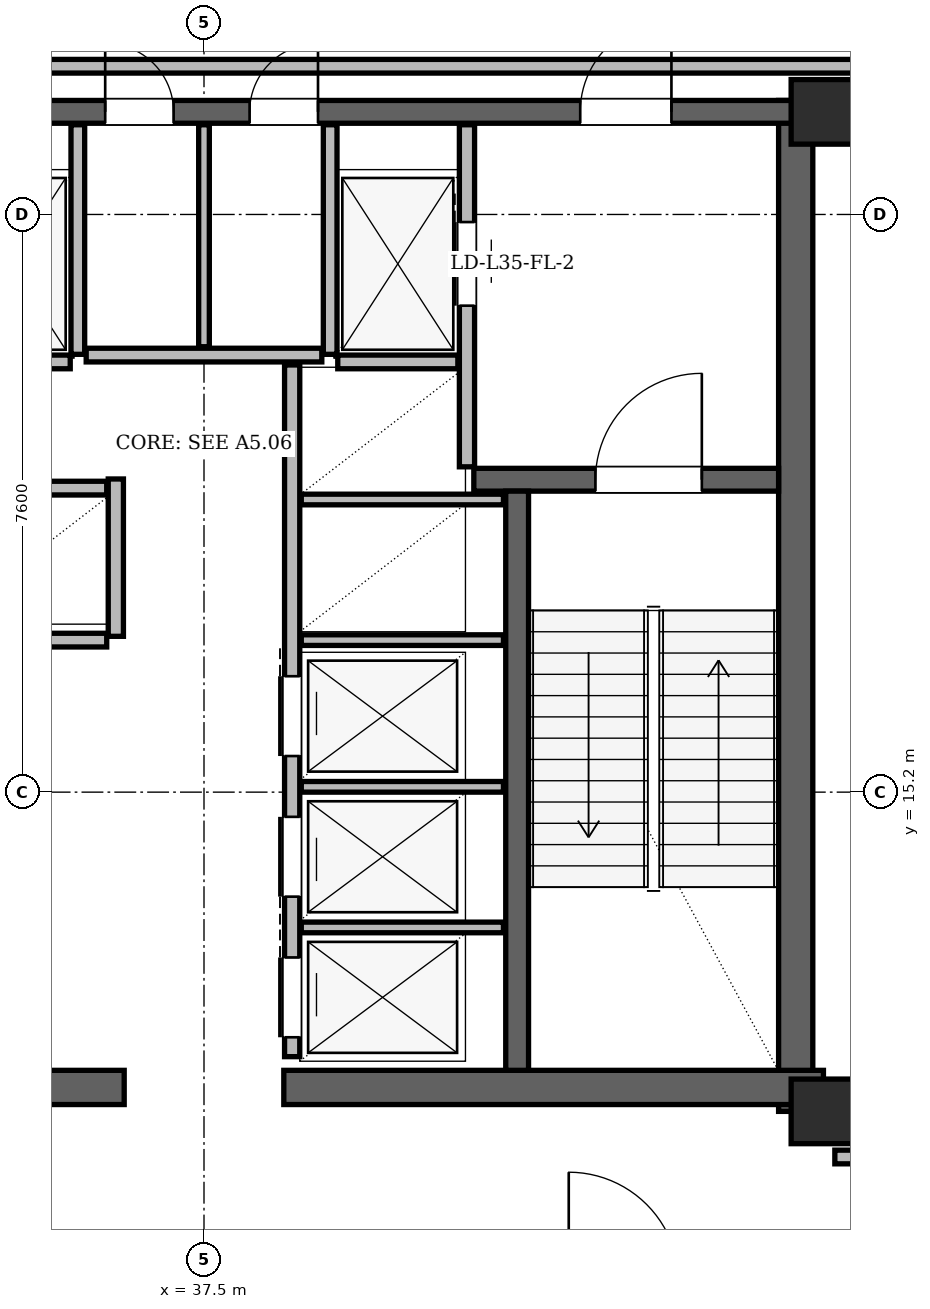
"""IFC4 building model, lengths in metres.
Left out: names, types, materials, properties, quantities, classifications, styles, units other than length and angle.
Written with IfcOpenShell. Run it as: python <this file> out.ifc"""

import sys

from ifc_helpers import new_model, si_unit, direction, frame, frame_2d, origin, origin_2d, place, context, subcontext, project, spatial, rectangle, hollow_rectangle, extrude, element, fill, save


model = new_model("IFC4")
c1 = context("Model", 3, precision=1e-05, world=origin(), true_north=direction((0.0, 1.0)))
c2 = subcontext(c1, "Body", "Model", "MODEL_VIEW")
j1 = project(units=[si_unit("LENGTHUNIT", "METRE"), si_unit("PLANEANGLEUNIT", "RADIAN")], contexts=[c1])
p1 = place(None, origin())
s1 = spatial("IfcSite", under=j1, at=p1, CompositionType="ELEMENT")
p2 = place(p1, origin())
s2 = spatial("IfcBuilding", under=s1, at=p2, CompositionType="ELEMENT")
p3 = place(p2, frame((0.0, 0.0, 133.8)))
s3 = spatial("IfcBuildingStorey", under=s2, at=p3, CompositionType="ELEMENT", Elevation=133.8)
for number, where, z_axis, x_axis in (
    (1, (45.65, 11.0, 0.0), (0.0, 0.0, 1.0), (1.0, 0.0, 0.0)),
    (2, (45.65, 24.15, 0.0), (0.0, 0.0, 1.0), (1.0, 0.0, 0.0)),
):
    element("IfcColumn", number, at=place(p3, frame(where, z_axis=z_axis, x_axis=x_axis)), inside=s3, PredefinedType="COLUMN", context=c2, shape_type="SweptSolid", body=[
        extrude(hollow_rectangle(XDim=0.85, YDim=0.85, WallThickness=0.07, at=origin_2d()), origin(), (0.0, 0.0, 1.0), 4.8),
    ])
p4 = place(p3, frame((45.285, 11.0, 0.0), z_axis=(0.0, 0.0, 1.0), x_axis=(0.0, 1.0, 0.0)))
e3 = element("IfcWall", 3, at=p4, inside=s3, PredefinedType="SHEAR", context=c2, shape_type="SweptSolid", body=[
    extrude(rectangle(XDim=13.3, YDim=0.45, at=frame_2d((6.65, 0.0))), origin(), (0.0, 0.0, 1.0), 4.56),
])
for number, where, z_axis, x_axis in (
    (4, (29.35, 11.315, 0.0), (0.0, 0.0, 1.0), (1.0, 0.0, 0.0)),
    (5, (38.55, 11.315, 0.0), (0.0, 0.0, 1.0), (1.0, 0.0, 0.0)),
):
    element("IfcWall", number, at=place(p3, frame(where, z_axis=z_axis, x_axis=x_axis)), inside=s3, PredefinedType="SHEAR", context=c2, shape_type="SweptSolid", body=[
        extrude(rectangle(XDim=7.1, YDim=0.45, at=frame_2d((3.55, 0.0))), origin(), (0.0, 0.0, 1.0), 4.56),
    ])
p5 = place(p3, frame((29.65, 24.15, 0.0), z_axis=(0.0, 0.0, 1.0), x_axis=(1.0, 0.0, 0.0)))
e6 = element("IfcWall", 6, at=p5, inside=s3, PredefinedType="SHEAR", context=c2, shape_type="SweptSolid", body=[
    extrude(rectangle(XDim=15.7, YDim=0.3, at=frame_2d((7.85, 0.0))), origin(), (0.0, 0.0, 1.0), 4.56),
])
p6 = place(p5, frame((1.7, 0.0, 0.0)))
e7 = element("IfcOpeningElement", 7, at=p6, cuts=e6, PredefinedType="OPENING", context=c2, shape_type="SweptSolid", body=[
    extrude(rectangle(XDim=1.2, YDim=2.2, at=frame_2d((0.6, 1.1))), frame((0.0, 0.15, 0.0), z_axis=(0.0, -1.0, 0.0), x_axis=(1.0, 0.0, 0.0)), (0.0, 0.0, 1.0), 0.3),
])
p7 = place(p5, frame((12.8, 0.0, 0.0)))
e8 = element("IfcOpeningElement", 8, at=p7, cuts=e6, PredefinedType="OPENING", context=c2, shape_type="SweptSolid", body=[
    extrude(rectangle(XDim=1.2, YDim=2.2, at=frame_2d((0.6, 1.1))), frame((0.0, 0.15, 0.0), z_axis=(0.0, -1.0, 0.0), x_axis=(1.0, 0.0, 0.0)), (0.0, 0.0, 1.0), 0.3),
])
p8 = place(p5, frame((6.55, 0.0, 0.0)))
e9 = element("IfcOpeningElement", 9, at=p8, cuts=e6, PredefinedType="OPENING", context=c2, shape_type="SweptSolid", body=[
    extrude(rectangle(XDim=0.9, YDim=2.05, at=frame_2d((0.45, 1.025))), frame((0.0, 0.15, 0.0), z_axis=(0.0, -1.0, 0.0), x_axis=(1.0, 0.0, 0.0)), (0.0, 0.0, 1.0), 0.3),
])
p9 = place(p5, frame((8.45, 0.0, 0.0)))
e10 = element("IfcOpeningElement", 10, at=p9, cuts=e6, PredefinedType="OPENING", context=c2, shape_type="SweptSolid", body=[
    extrude(rectangle(XDim=0.9, YDim=2.05, at=frame_2d((0.45, 1.025))), frame((0.0, 0.15, 0.0), z_axis=(0.0, -1.0, 0.0), x_axis=(1.0, 0.0, 0.0)), (0.0, 0.0, 1.0), 0.3),
])
p10 = place(p3, frame((41.05, 19.31, 0.0), z_axis=(0.0, 0.0, 1.0), x_axis=(1.0, 0.0, 0.0)))
e11 = element("IfcWall", 11, at=p10, inside=s3, PredefinedType="SHEAR", context=c2, shape_type="SweptSolid", body=[
    extrude(rectangle(XDim=4.01, YDim=0.3, at=frame_2d((2.005, 0.0))), origin(), (0.0, 0.0, 1.0), 4.56),
])
p11 = place(p10, frame((1.6, 0.0, 0.0)))
e12 = element("IfcOpeningElement", 12, at=p11, cuts=e11, PredefinedType="OPENING", context=c2, shape_type="SweptSolid", body=[
    extrude(rectangle(XDim=1.4, YDim=2.2, at=frame_2d((0.7, 1.1))), frame((0.0, 0.15, 0.0), z_axis=(0.0, -1.0, 0.0), x_axis=(1.0, 0.0, 0.0)), (0.0, 0.0, 1.0), 0.3),
])
p12 = place(p3, frame((41.62, 11.54, 0.0), z_axis=(0.0, 0.0, 1.0), x_axis=(0.0, 1.0, 0.0)))
e13 = element("IfcWall", 13, at=p12, inside=s3, PredefinedType="SHEAR", context=c2, shape_type="SweptSolid", body=[
    extrude(rectangle(XDim=7.62, YDim=0.3, at=frame_2d((3.81, 0.0))), origin(), (0.0, 0.0, 1.0), 4.56),
])
p13 = place(p3, frame((60.206, 12.89, 0.0), z_axis=(0.0, 0.0, 1.0), x_axis=(-0.4999978793, 0.866026628168, 0.0)))
e14 = element("IfcWall", 14, at=p13, inside=s3, PredefinedType="SOLIDWALL", context=c2, shape_type="SweptSolid", body=[
    extrude(rectangle(XDim=35.194, YDim=0.34, at=frame_2d((17.597, 0.0))), origin(), (0.0, 0.0, 1.0), 3.55),
])
p14 = place(p3, frame((35.84, 20.96, 0.0), z_axis=(0.0, 0.0, 1.0), x_axis=(0.0, 1.0, 0.0)))
e15 = element("IfcWall", 15, at=p14, inside=s3, PredefinedType="PARTITIONING", context=c2, shape_type="SweptSolid", body=[
    extrude(rectangle(XDim=3.02, YDim=0.18, at=frame_2d((1.51, 0.0))), origin(), (0.0, 0.0, 1.0), 3.6),
])
p15 = place(p3, frame((34.16, 20.86, 0.0), z_axis=(0.0, 0.0, 1.0), x_axis=(1.0, 0.0, 0.0)))
e16 = element("IfcWall", 16, at=p15, inside=s3, PredefinedType="PARTITIONING", context=c2, shape_type="SweptSolid", body=[
    extrude(rectangle(XDim=1.58, YDim=0.18, at=frame_2d((0.79, 0.0))), origin(), (0.0, 0.0, 1.0), 4.56),
])
p16 = place(p3, frame((40.96, 19.48, 0.0), z_axis=(0.0, 0.0, 1.0), x_axis=(0.0, 1.0, 0.0)))
e17 = element("IfcWall", 17, at=p16, inside=s3, PredefinedType="PARTITIONING", context=c2, shape_type="SweptSolid", body=[
    extrude(rectangle(XDim=4.5, YDim=0.2, at=frame_2d((2.25, 0.0))), origin(), (0.0, 0.0, 1.0), 3.6),
])
p17 = place(p16, frame((2.12, 0.0, 0.0)))
e18 = element("IfcOpeningElement", 18, at=p17, cuts=e17, PredefinedType="OPENING", context=c2, shape_type="SweptSolid", body=[
    extrude(rectangle(XDim=1.1, YDim=2.2, at=frame_2d((0.55, 1.1))), frame((0.0, 0.1, 0.0), z_axis=(0.0, -1.0, 0.0), x_axis=(1.0, 0.0, 0.0)), (0.0, 0.0, 1.0), 0.2),
])
p18 = place(p3, frame((39.16, 20.96, 0.0), z_axis=(0.0, 0.0, 1.0), x_axis=(0.0, 1.0, 0.0)))
e19 = element("IfcWall", 19, at=p18, inside=s3, PredefinedType="PARTITIONING", context=c2, shape_type="SweptSolid", body=[
    extrude(rectangle(XDim=3.02, YDim=0.18, at=frame_2d((1.51, 0.0))), origin(), (0.0, 0.0, 1.0), 3.6),
])
p19 = place(p3, frame((39.26, 20.86, 0.0), z_axis=(0.0, 0.0, 1.0), x_axis=(1.0, 0.0, 0.0)))
e20 = element("IfcWall", 20, at=p19, inside=s3, PredefinedType="PARTITIONING", context=c2, shape_type="SweptSolid", body=[
    extrude(rectangle(XDim=1.58, YDim=0.18, at=frame_2d((0.79, 0.0))), origin(), (0.0, 0.0, 1.0), 4.56),
])
p20 = place(p3, frame((36.34, 17.25, 0.0), z_axis=(0.0, 0.0, 1.0), x_axis=(0.0, 1.0, 0.0)))
e21 = element("IfcWall", 21, at=p20, inside=s3, PredefinedType="PARTITIONING", context=c2, shape_type="SweptSolid", body=[
    extrude(rectangle(XDim=2.07, YDim=0.2, at=frame_2d((1.035, 0.0))), origin(), (0.0, 0.0, 1.0), 4.56),
])
p21 = place(p3, frame((33.95, 19.2, 0.0), z_axis=(0.0, 0.0, 1.0), x_axis=(1.0, 0.0, 0.0)))
e22 = element("IfcWall", 22, at=p21, inside=s3, PredefinedType="PARTITIONING", context=c2, shape_type="SweptSolid", body=[
    extrude(rectangle(XDim=2.27, YDim=0.18, at=frame_2d((1.135, 0.0))), origin(), (0.0, 0.0, 1.0), 4.56),
])
p22 = place(p3, frame((33.56, 17.2, 0.0), z_axis=(0.0, 0.0, 1.0), x_axis=(1.0, 0.0, 0.0)))
e23 = element("IfcWall", 23, at=p22, inside=s3, PredefinedType="PARTITIONING", context=c2, shape_type="SweptSolid", body=[
    extrude(rectangle(XDim=2.66, YDim=0.18, at=frame_2d((1.33, 0.0))), origin(), (0.0, 0.0, 1.0), 4.56),
])
p23 = place(p3, frame((38.66, 11.72, 0.0), z_axis=(0.0, 0.0, 1.0), x_axis=(0.0, 1.0, 0.0)))
e24 = element("IfcWall", 24, at=p23, inside=s3, PredefinedType="PARTITIONING", context=c2, shape_type="SweptSolid", body=[
    extrude(rectangle(XDim=9.1, YDim=0.2, at=frame_2d((4.55, 0.0))), origin(), (0.0, 0.0, 1.0), 4.56),
])
p24 = place(p23, frame((0.255, 0.0, 0.0)))
e25 = element("IfcOpeningElement", 25, at=p24, cuts=e24, PredefinedType="OPENING", context=c2, shape_type="SweptSolid", body=[
    extrude(rectangle(XDim=1.05, YDim=2.15, at=frame_2d((0.525, 1.075))), frame((0.0, 0.1, 0.0), z_axis=(0.0, -1.0, 0.0), x_axis=(1.0, 0.0, 0.0)), (0.0, 0.0, 1.0), 0.2),
])
p25 = place(p23, frame((2.105, 0.0, 0.0)))
e26 = element("IfcOpeningElement", 26, at=p25, cuts=e24, PredefinedType="OPENING", context=c2, shape_type="SweptSolid", body=[
    extrude(rectangle(XDim=1.05, YDim=2.15, at=frame_2d((0.525, 1.075))), frame((0.0, 0.1, 0.0), z_axis=(0.0, -1.0, 0.0), x_axis=(1.0, 0.0, 0.0)), (0.0, 0.0, 1.0), 0.2),
])
p26 = place(p23, frame((3.955, 0.0, 0.0)))
e27 = element("IfcOpeningElement", 27, at=p26, cuts=e24, PredefinedType="OPENING", context=c2, shape_type="SweptSolid", body=[
    extrude(rectangle(XDim=1.05, YDim=2.15, at=frame_2d((0.525, 1.075))), frame((0.0, 0.1, 0.0), z_axis=(0.0, -1.0, 0.0), x_axis=(1.0, 0.0, 0.0)), (0.0, 0.0, 1.0), 0.2),
])
for number, where, z_axis, x_axis in (
    (28, (38.78, 13.42, 0.0), (0.0, 0.0, 1.0), (1.0, 0.0, 0.0)),
    (29, (38.78, 15.27, 0.0), (0.0, 0.0, 1.0), (1.0, 0.0, 0.0)),
    (30, (38.78, 17.2, 0.0), (0.0, 0.0, 1.0), (1.0, 0.0, 0.0)),
    (31, (38.78, 19.05, 0.0), (0.0, 0.0, 1.0), (1.0, 0.0, 0.0)),
):
    element("IfcWall", number, at=place(p3, frame(where, z_axis=z_axis, x_axis=x_axis)), inside=s3, PredefinedType="PARTITIONING", context=c2, shape_type="SweptSolid", body=[
        extrude(rectangle(XDim=2.66, YDim=0.14, at=frame_2d((1.33, 0.0))), origin(), (0.0, 0.0, 1.0), 4.56),
    ])
p27 = place(p3, frame((35.95, 20.95, 0.0), z_axis=(0.0, 0.0, 1.0), x_axis=(1.0, 0.0, 0.0)))
e32 = element("IfcWall", 32, at=p27, inside=s3, PredefinedType="PARTITIONING", context=c2, shape_type="SweptSolid", body=[
    extrude(rectangle(XDim=3.1, YDim=0.18, at=frame_2d((1.55, 0.0))), origin(), (0.0, 0.0, 1.0), 4.56),
])
p28 = place(p3, frame((37.5, 21.06, 0.0), z_axis=(0.0, 0.0, 1.0), x_axis=(0.0, 1.0, 0.0)))
e33 = element("IfcWall", 33, at=p28, inside=s3, PredefinedType="PARTITIONING", context=c2, shape_type="SweptSolid", body=[
    extrude(rectangle(XDim=2.92, YDim=0.14, at=frame_2d((1.46, 0.0))), origin(), (0.0, 0.0, 1.0), 3.6),
])
p29 = place(p3, frame((45.8, 10.4, 0.0), z_axis=(0.0, 0.0, 1.0), x_axis=(1.0, 0.0, 0.0)))
e34 = element("IfcWall", 34, at=p29, inside=s3, PredefinedType="PARTITIONING", context=c2, shape_type="SweptSolid", body=[
    extrude(rectangle(XDim=2.8, YDim=0.18, at=frame_2d((1.4, 0.0))), origin(), (0.0, 0.0, 1.0), 4.014),
])
p30 = place(p3, frame((28.62, 24.75, 0.0), z_axis=(0.0, 0.0, 1.0), x_axis=(1.0, 0.0, 0.0)))
e35 = element("IfcWall", 35, at=p30, inside=s3, PredefinedType="PARTITIONING", context=c2, shape_type="SweptSolid", body=[
    extrude(rectangle(XDim=19.98, YDim=0.18, at=frame_2d((9.99, 0.0))), origin(), (0.0, 0.0, 1.0), 4.014),
])
p31 = place(p17, origin())
e36 = element("IfcDoor", 36, at=p31, inside=s3, OperationType="SLIDING_TO_RIGHT", PredefinedType="DOOR", context=c2, shape_type="SweptSolid", body=[
    extrude(rectangle(XDim=1.1, YDim=2.2, at=frame_2d((0.55, 1.1))), frame((0.0, 0.025, 0.0), z_axis=(0.0, -1.0, 0.0), x_axis=(1.0, 0.0, 0.0)), (0.0, 0.0, 1.0), 0.05),
])
fill(e18, e36)
p32 = place(p24, origin())
e37 = element("IfcDoor", 37, at=p32, inside=s3, OperationType="SLIDING_TO_RIGHT", PredefinedType="DOOR", context=c2, shape_type="SweptSolid", body=[
    extrude(rectangle(XDim=1.05, YDim=2.15, at=frame_2d((0.525, 1.075))), frame((0.0, 0.025, 0.0), z_axis=(0.0, -1.0, 0.0), x_axis=(1.0, 0.0, 0.0)), (0.0, 0.0, 1.0), 0.05),
])
fill(e25, e37)
p33 = place(p25, origin())
e38 = element("IfcDoor", 38, at=p33, inside=s3, OperationType="SLIDING_TO_LEFT", PredefinedType="DOOR", context=c2, shape_type="SweptSolid", body=[
    extrude(rectangle(XDim=1.05, YDim=2.15, at=frame_2d((0.525, 1.075))), frame((0.0, 0.025, 0.0), z_axis=(0.0, -1.0, 0.0), x_axis=(1.0, 0.0, 0.0)), (0.0, 0.0, 1.0), 0.05),
])
fill(e26, e38)
p34 = place(p26, origin())
e39 = element("IfcDoor", 39, at=p34, inside=s3, OperationType="SLIDING_TO_RIGHT", PredefinedType="DOOR", context=c2, shape_type="SweptSolid", body=[
    extrude(rectangle(XDim=1.05, YDim=2.15, at=frame_2d((0.525, 1.075))), frame((0.0, 0.025, 0.0), z_axis=(0.0, -1.0, 0.0), x_axis=(1.0, 0.0, 0.0)), (0.0, 0.0, 1.0), 0.05),
])
fill(e27, e39)
p35 = place(p11, origin())
e40 = element("IfcDoor", 40, at=p35, inside=s3, OperationType="SINGLE_SWING_RIGHT", PredefinedType="DOOR", context=c2, shape_type="SweptSolid", body=[
    extrude(rectangle(XDim=1.4, YDim=2.2, at=frame_2d((0.7, 1.1))), frame((0.0, 0.025, 0.0), z_axis=(0.0, -1.0, 0.0), x_axis=(1.0, 0.0, 0.0)), (0.0, 0.0, 1.0), 0.05),
])
fill(e12, e40)
p36 = place(p7, origin())
e41 = element("IfcDoor", 41, at=p36, inside=s3, OperationType="SINGLE_SWING_RIGHT", PredefinedType="DOOR", context=c2, shape_type="SweptSolid", body=[
    extrude(rectangle(XDim=1.2, YDim=2.2, at=frame_2d((0.6, 1.1))), frame((0.0, 0.025, 0.0), z_axis=(0.0, -1.0, 0.0), x_axis=(1.0, 0.0, 0.0)), (0.0, 0.0, 1.0), 0.05),
])
fill(e8, e41)
p37 = place(p8, origin())
e42 = element("IfcDoor", 42, at=p37, inside=s3, OperationType="SINGLE_SWING_LEFT", PredefinedType="DOOR", context=c2, shape_type="SweptSolid", body=[
    extrude(rectangle(XDim=0.9, YDim=2.05, at=frame_2d((0.45, 1.025))), frame((0.0, 0.025, 0.0), z_axis=(0.0, -1.0, 0.0), x_axis=(1.0, 0.0, 0.0)), (0.0, 0.0, 1.0), 0.05),
])
fill(e9, e42)
p38 = place(p9, origin())
e43 = element("IfcDoor", 43, at=p38, inside=s3, OperationType="SINGLE_SWING_RIGHT", PredefinedType="DOOR", context=c2, shape_type="SweptSolid", body=[
    extrude(rectangle(XDim=0.9, YDim=2.05, at=frame_2d((0.45, 1.025))), frame((0.0, 0.025, 0.0), z_axis=(0.0, -1.0, 0.0), x_axis=(1.0, 0.0, 0.0)), (0.0, 0.0, 1.0), 0.05),
])
fill(e10, e43)
save(model, sys.argv[1])
